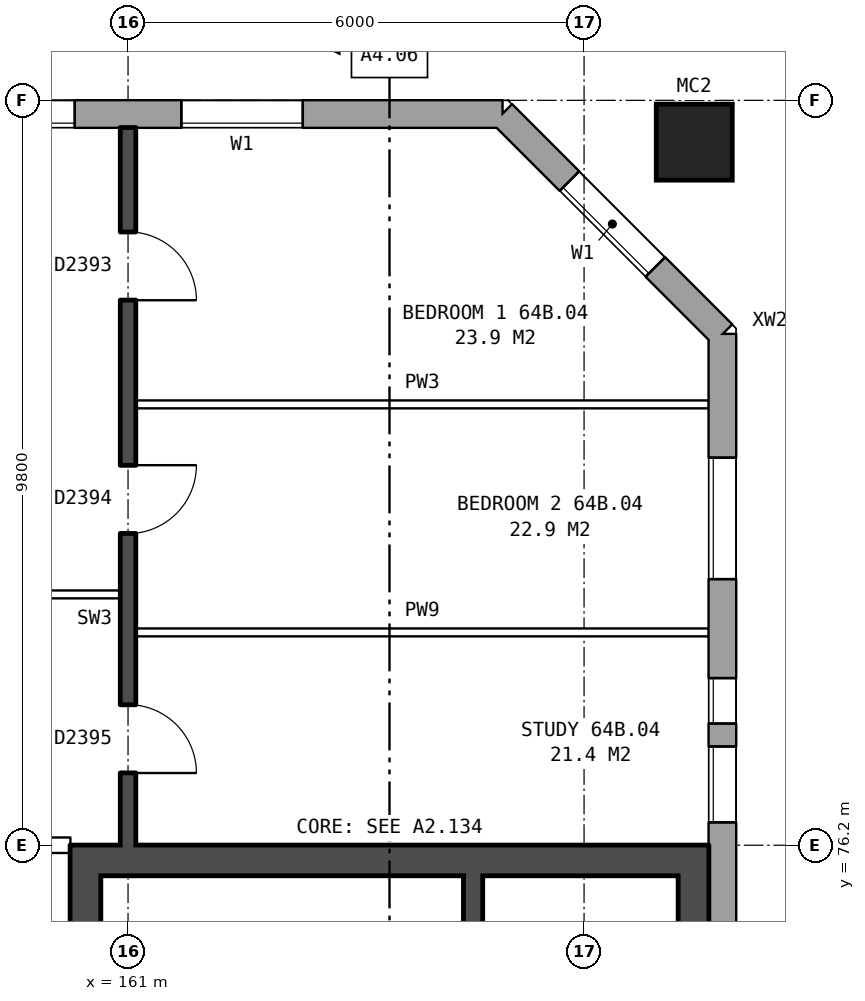
"""IFC4 building model, lengths in metres.
Left out: names, types, materials, properties, quantities, classifications, styles, units other than length and angle.
Written with IfcOpenShell. Run it as: python <this file> out.ifc"""

import sys

from ifc_helpers import new_model, si_unit, direction, frame, frame_2d, origin, origin_2d, place, context, subcontext, project, spatial, rectangle, hollow_rectangle, extrude, element, fill, save


model = new_model("IFC4")
c1 = context("Model", 3, precision=1e-05, world=origin(), true_north=direction((0.0, 1.0)))
c2 = subcontext(c1, "Body", "Model", "MODEL_VIEW")
j1 = project(units=[si_unit("LENGTHUNIT", "METRE"), si_unit("PLANEANGLEUNIT", "RADIAN")], contexts=[c1])
p1 = place(None, origin())
s1 = spatial("IfcSite", under=j1, at=p1, CompositionType="ELEMENT")
p2 = place(p1, origin())
s2 = spatial("IfcBuilding", under=s1, at=p2, CompositionType="ELEMENT")
p3 = place(p2, frame((0.0, 0.0, 227.6)))
s3 = spatial("IfcBuildingStorey", under=s2, at=p3, CompositionType="ELEMENT", Elevation=227.6)
p4 = place(p3, frame((168.45, 85.45, 0.0), z_axis=(0.0, 0.0, 1.0), x_axis=(1.0, 0.0, 0.0)))
e1 = element("IfcColumn", 1, at=p4, inside=s3, PredefinedType="COLUMN", context=c2, shape_type="SweptSolid", body=[
    extrude(hollow_rectangle(XDim=1.0, YDim=1.0, WallThickness=0.055, at=origin_2d()), origin(), (0.0, 0.0, 1.0), 3.1),
])
p5 = place(p3, frame((168.82, 57.075, 0.0), z_axis=(0.0, 0.0, 1.0), x_axis=(0.0, 1.0, 0.0)))
e2 = element("IfcWall", 2, at=p5, inside=s3, PredefinedType="STANDARD", context=c2, shape_type="SweptSolid", body=[
    extrude(rectangle(XDim=25.851, YDim=0.36, at=frame_2d((12.925, 0.0))), origin(), (0.0, 0.0, 1.0), 2.85),
])
p6 = place(p5, frame((1.625, 0.0, 0.8)))
e3 = element("IfcOpeningElement", 3, at=p6, cuts=e2, PredefinedType="OPENING", context=c2, shape_type="SweptSolid", body=[
    extrude(rectangle(XDim=1.6, YDim=1.8, at=frame_2d((0.8, 0.9))), frame((0.0, 0.19, 0.0), z_axis=(0.0, -1.0, 0.0), x_axis=(1.0, 0.0, 0.0)), (0.0, 0.0, 1.0), 0.38),
])
p7 = place(p5, frame((4.425, 0.0, 1.7)))
e4 = element("IfcOpeningElement", 4, at=p7, cuts=e2, PredefinedType="OPENING", context=c2, shape_type="SweptSolid", body=[
    extrude(rectangle(XDim=0.6, YDim=0.9, at=frame_2d((0.3, 0.45))), frame((0.0, 0.19, 0.0), z_axis=(0.0, -1.0, 0.0), x_axis=(1.0, 0.0, 0.0)), (0.0, 0.0, 1.0), 0.38),
])
p8 = place(p5, frame((19.425, 0.0, 0.8)))
e5 = element("IfcOpeningElement", 5, at=p8, cuts=e2, PredefinedType="OPENING", context=c2, shape_type="SweptSolid", body=[
    extrude(rectangle(XDim=1.0, YDim=1.8, at=frame_2d((0.5, 0.9))), frame((0.0, 0.19, 0.0), z_axis=(0.0, -1.0, 0.0), x_axis=(1.0, 0.0, 0.0)), (0.0, 0.0, 1.0), 0.38),
])
p9 = place(p5, frame((22.625, 0.0, 0.8)))
e6 = element("IfcOpeningElement", 6, at=p9, cuts=e2, PredefinedType="OPENING", context=c2, shape_type="SweptSolid", body=[
    extrude(rectangle(XDim=1.6, YDim=1.8, at=frame_2d((0.8, 0.9))), frame((0.0, 0.19, 0.0), z_axis=(0.0, -1.0, 0.0), x_axis=(1.0, 0.0, 0.0)), (0.0, 0.0, 1.0), 0.38),
])
p10 = place(p5, frame((5.325, 0.0, 0.8)))
e7 = element("IfcOpeningElement", 7, at=p10, cuts=e2, PredefinedType="OPENING", context=c2, shape_type="SweptSolid", body=[
    extrude(rectangle(XDim=1.0, YDim=1.8, at=frame_2d((0.5, 0.9))), frame((0.0, 0.19, 0.0), z_axis=(0.0, -1.0, 0.0), x_axis=(1.0, 0.0, 0.0)), (0.0, 0.0, 1.0), 0.38),
])
p11 = place(p5, frame((20.725, 0.0, 1.6)))
e8 = element("IfcOpeningElement", 8, at=p11, cuts=e2, PredefinedType="OPENING", context=c2, shape_type="SweptSolid", body=[
    extrude(rectangle(XDim=0.6, YDim=0.9, at=frame_2d((0.3, 0.45))), frame((0.0, 0.19, 0.0), z_axis=(0.0, -1.0, 0.0), x_axis=(1.0, 0.0, 0.0)), (0.0, 0.0, 1.0), 0.38),
])
p12 = place(p3, frame((168.82, 82.925, 0.0), z_axis=(0.0, 0.0, 1.0), x_axis=(-0.707106781187, 0.707106781187, 0.0)))
e9 = element("IfcWall", 9, at=p12, inside=s3, PredefinedType="STANDARD", context=c2, shape_type="SweptSolid", body=[
    extrude(rectangle(XDim=4.094, YDim=0.36, at=frame_2d((2.047, 0.0))), origin(), (0.0, 0.0, 1.0), 2.85),
])
p13 = place(p12, frame((1.247, 0.0, 0.8)))
e10 = element("IfcOpeningElement", 10, at=p13, cuts=e9, PredefinedType="OPENING", context=c2, shape_type="SweptSolid", body=[
    extrude(rectangle(XDim=1.6, YDim=1.8, at=frame_2d((0.8, 0.9))), frame((0.0, 0.19, 0.0), z_axis=(0.0, -1.0, 0.0), x_axis=(1.0, 0.0, 0.0)), (0.0, 0.0, 1.0), 0.38),
])
p14 = place(p3, frame((165.925, 85.82, 0.0), z_axis=(0.0, 0.0, 1.0), x_axis=(-1.0, 0.0, 0.0)))
e11 = element("IfcWall", 11, at=p14, inside=s3, PredefinedType="STANDARD", context=c2, shape_type="SweptSolid", body=[
    extrude(rectangle(XDim=33.875, YDim=0.36, at=frame_2d((16.938, 0.0))), origin(), (0.0, 0.0, 1.0), 2.85),
])
p15 = place(p14, frame((2.625, 0.0, 0.8)))
e12 = element("IfcOpeningElement", 12, at=p15, cuts=e11, PredefinedType="OPENING", context=c2, shape_type="SweptSolid", body=[
    extrude(rectangle(XDim=1.6, YDim=1.8, at=frame_2d((0.8, 0.9))), frame((0.0, 0.19, 0.0), z_axis=(0.0, -1.0, 0.0), x_axis=(1.0, 0.0, 0.0)), (0.0, 0.0, 1.0), 0.38),
])
p16 = place(p14, frame((5.625, 0.0, 0.8)))
e13 = element("IfcOpeningElement", 13, at=p16, cuts=e11, PredefinedType="OPENING", context=c2, shape_type="SweptSolid", body=[
    extrude(rectangle(XDim=1.6, YDim=1.8, at=frame_2d((0.8, 0.9))), frame((0.0, 0.19, 0.0), z_axis=(0.0, -1.0, 0.0), x_axis=(1.0, 0.0, 0.0)), (0.0, 0.0, 1.0), 0.38),
])
p17 = place(p14, frame((8.625, 0.0, 0.8)))
e14 = element("IfcOpeningElement", 14, at=p17, cuts=e11, PredefinedType="OPENING", context=c2, shape_type="SweptSolid", body=[
    extrude(rectangle(XDim=1.6, YDim=1.8, at=frame_2d((0.8, 0.9))), frame((0.0, 0.19, 0.0), z_axis=(0.0, -1.0, 0.0), x_axis=(1.0, 0.0, 0.0)), (0.0, 0.0, 1.0), 0.38),
])
p18 = place(p14, frame((12.675, 0.0, 0.15)))
e15 = element("IfcOpeningElement", 15, at=p18, cuts=e11, PredefinedType="OPENING", context=c2, shape_type="SweptSolid", body=[
    extrude(rectangle(XDim=1.0, YDim=1.8, at=frame_2d((0.5, 0.9))), frame((0.0, 0.19, 0.0), z_axis=(0.0, -1.0, 0.0), x_axis=(1.0, 0.0, 0.0)), (0.0, 0.0, 1.0), 0.38),
])
p19 = place(p14, frame((14.625, 0.0, 0.8)))
e16 = element("IfcOpeningElement", 16, at=p19, cuts=e11, PredefinedType="OPENING", context=c2, shape_type="SweptSolid", body=[
    extrude(rectangle(XDim=1.6, YDim=1.8, at=frame_2d((0.8, 0.9))), frame((0.0, 0.19, 0.0), z_axis=(0.0, -1.0, 0.0), x_axis=(1.0, 0.0, 0.0)), (0.0, 0.0, 1.0), 0.38),
])
p20 = place(p14, frame((17.125, 0.0, 0.8)))
e17 = element("IfcOpeningElement", 17, at=p20, cuts=e11, PredefinedType="OPENING", context=c2, shape_type="SweptSolid", body=[
    extrude(rectangle(XDim=1.6, YDim=1.8, at=frame_2d((0.8, 0.9))), frame((0.0, 0.19, 0.0), z_axis=(0.0, -1.0, 0.0), x_axis=(1.0, 0.0, 0.0)), (0.0, 0.0, 1.0), 0.38),
])
p21 = place(p14, frame((20.425, 0.0, 1.7)))
e18 = element("IfcOpeningElement", 18, at=p21, cuts=e11, PredefinedType="OPENING", context=c2, shape_type="SweptSolid", body=[
    extrude(rectangle(XDim=0.6, YDim=0.9, at=frame_2d((0.3, 0.45))), frame((0.0, 0.19, 0.0), z_axis=(0.0, -1.0, 0.0), x_axis=(1.0, 0.0, 0.0)), (0.0, 0.0, 1.0), 0.38),
])
p22 = place(p14, frame((23.625, 0.0, 0.8)))
e19 = element("IfcOpeningElement", 19, at=p22, cuts=e11, PredefinedType="OPENING", context=c2, shape_type="SweptSolid", body=[
    extrude(rectangle(XDim=1.6, YDim=1.8, at=frame_2d((0.8, 0.9))), frame((0.0, 0.19, 0.0), z_axis=(0.0, -1.0, 0.0), x_axis=(1.0, 0.0, 0.0)), (0.0, 0.0, 1.0), 0.38),
])
p23 = place(p14, frame((26.625, 0.0, 0.8)))
e20 = element("IfcOpeningElement", 20, at=p23, cuts=e11, PredefinedType="OPENING", context=c2, shape_type="SweptSolid", body=[
    extrude(rectangle(XDim=1.6, YDim=1.8, at=frame_2d((0.8, 0.9))), frame((0.0, 0.19, 0.0), z_axis=(0.0, -1.0, 0.0), x_axis=(1.0, 0.0, 0.0)), (0.0, 0.0, 1.0), 0.38),
])
p24 = place(p14, frame((29.625, 0.0, 0.8)))
e21 = element("IfcOpeningElement", 21, at=p24, cuts=e11, PredefinedType="OPENING", context=c2, shape_type="SweptSolid", body=[
    extrude(rectangle(XDim=1.6, YDim=1.8, at=frame_2d((0.8, 0.9))), frame((0.0, 0.19, 0.0), z_axis=(0.0, -1.0, 0.0), x_axis=(1.0, 0.0, 0.0)), (0.0, 0.0, 1.0), 0.38),
])
p25 = place(p14, frame((21.325, 0.0, 0.8)))
e22 = element("IfcOpeningElement", 22, at=p25, cuts=e11, PredefinedType="OPENING", context=c2, shape_type="SweptSolid", body=[
    extrude(rectangle(XDim=1.4, YDim=1.8, at=frame_2d((0.7, 0.9))), frame((0.0, 0.19, 0.0), z_axis=(0.0, -1.0, 0.0), x_axis=(1.0, 0.0, 0.0)), (0.0, 0.0, 1.0), 0.38),
])
p26 = place(p3, frame((160.44, 76.2, 0.0), z_axis=(0.0, 0.0, 1.0), x_axis=(0.0, -1.0, 0.0)))
e23 = element("IfcWall", 23, at=p26, inside=s3, PredefinedType="SHEAR", context=c2, shape_type="SweptSolid", body=[
    extrude(rectangle(XDim=12.4, YDim=0.4, at=frame_2d((6.2, 0.0))), origin(), (0.0, 0.0, 1.0), 2.85),
])
p27 = place(p26, frame((1.325, 0.0, 0.0)))
e24 = element("IfcOpeningElement", 24, at=p27, cuts=e23, PredefinedType="OPENING", context=c2, shape_type="SweptSolid", body=[
    extrude(rectangle(XDim=1.1, YDim=2.1, at=frame_2d((0.55, 1.05))), frame((0.0, 0.21, 0.0), z_axis=(0.0, -1.0, 0.0), x_axis=(1.0, 0.0, 0.0)), (0.0, 0.0, 1.0), 0.42),
])
p28 = place(p26, frame((3.625, 0.0, 0.0)))
e25 = element("IfcOpeningElement", 25, at=p28, cuts=e23, PredefinedType="OPENING", context=c2, shape_type="SweptSolid", body=[
    extrude(rectangle(XDim=0.85, YDim=2.1, at=frame_2d((0.425, 1.05))), frame((0.0, 0.21, 0.0), z_axis=(0.0, -1.0, 0.0), x_axis=(1.0, 0.0, 0.0)), (0.0, 0.0, 1.0), 0.42),
])
p29 = place(p26, frame((5.775, 0.0, 0.0)))
e26 = element("IfcOpeningElement", 26, at=p29, cuts=e23, PredefinedType="OPENING", context=c2, shape_type="SweptSolid", body=[
    extrude(rectangle(XDim=0.85, YDim=2.1, at=frame_2d((0.425, 1.05))), frame((0.0, 0.21, 0.0), z_axis=(0.0, -1.0, 0.0), x_axis=(1.0, 0.0, 0.0)), (0.0, 0.0, 1.0), 0.42),
])
p30 = place(p26, frame((9.9, 0.0, 0.0)))
e27 = element("IfcOpeningElement", 27, at=p30, cuts=e23, PredefinedType="OPENING", context=c2, shape_type="SweptSolid", body=[
    extrude(rectangle(XDim=1.1, YDim=2.1, at=frame_2d((0.55, 1.05))), frame((0.0, 0.21, 0.0), z_axis=(0.0, -1.0, 0.0), x_axis=(1.0, 0.0, 0.0)), (0.0, 0.0, 1.0), 0.42),
])
p31 = place(p26, frame((8.125, 0.0, 0.0)))
e28 = element("IfcOpeningElement", 28, at=p31, cuts=e23, PredefinedType="OPENING", context=c2, shape_type="SweptSolid", body=[
    extrude(rectangle(XDim=0.85, YDim=2.1, at=frame_2d((0.425, 1.05))), frame((0.0, 0.21, 0.0), z_axis=(0.0, -1.0, 0.0), x_axis=(1.0, 0.0, 0.0)), (0.0, 0.0, 1.0), 0.42),
])
p32 = place(p3, frame((168.44, 76.2, 0.0), z_axis=(0.0, 0.0, 1.0), x_axis=(0.0, -1.0, 0.0)))
e29 = element("IfcWall", 29, at=p32, inside=s3, PredefinedType="SHEAR", context=c2, shape_type="SweptSolid", body=[
    extrude(rectangle(XDim=12.4, YDim=0.4, at=frame_2d((6.2, 0.0))), origin(), (0.0, 0.0, 1.0), 2.85),
])
p33 = place(p3, frame((160.64, 76.0, 0.0), z_axis=(0.0, 0.0, 1.0), x_axis=(1.0, 0.0, 0.0)))
e30 = element("IfcWall", 30, at=p33, inside=s3, PredefinedType="SHEAR", context=c2, shape_type="SweptSolid", body=[
    extrude(rectangle(XDim=7.6, YDim=0.4, at=frame_2d((3.8, 0.0))), origin(), (0.0, 0.0, 1.0), 2.85),
])
p34 = place(p3, frame((165.54, 75.8, 0.0), z_axis=(0.0, 0.0, 1.0), x_axis=(0.0, -1.0, 0.0)))
e31 = element("IfcWall", 31, at=p34, inside=s3, PredefinedType="SHEAR", context=c2, shape_type="SweptSolid", body=[
    extrude(rectangle(XDim=6.925, YDim=0.25, at=frame_2d((3.462, 0.0))), origin(), (0.0, 0.0, 1.0), 2.85),
])
p35 = place(p3, frame((157.24, 76.2, 0.0), z_axis=(0.0, 0.0, 1.0), x_axis=(1.0, 0.0, 0.0)))
e32 = element("IfcWall", 32, at=p35, inside=s3, PredefinedType="PARTITIONING", context=c2, shape_type="SweptSolid", body=[
    extrude(rectangle(XDim=3.0, YDim=0.2, at=frame_2d((1.5, 0.0))), origin(), (0.0, 0.0, 1.0), 2.85),
])
p36 = place(p35, frame((1.0, 0.0, 0.0)))
e33 = element("IfcOpeningElement", 33, at=p36, cuts=e32, PredefinedType="OPENING", context=c2, shape_type="SweptSolid", body=[
    extrude(rectangle(XDim=1.0, YDim=2.1, at=frame_2d((0.5, 1.05))), frame((0.0, 0.11, 0.0), z_axis=(0.0, -1.0, 0.0), x_axis=(1.0, 0.0, 0.0)), (0.0, 0.0, 1.0), 0.22),
])
p37 = place(p3, frame((161.1, 79.0, 0.0), z_axis=(0.0, 0.0, 1.0), x_axis=(1.0, 0.0, 0.0)))
e34 = element("IfcWall", 34, at=p37, inside=s3, PredefinedType="PARTITIONING", context=c2, shape_type="SweptSolid", body=[
    extrude(rectangle(XDim=7.54, YDim=0.1, at=frame_2d((3.77, 0.0))), origin(), (0.0, 0.0, 1.0), 2.85),
])
p38 = place(p3, frame((155.1, 79.5, 0.0), z_axis=(0.0, 0.0, 1.0), x_axis=(1.0, 0.0, 0.0)))
e35 = element("IfcWall", 35, at=p38, inside=s3, PredefinedType="PARTITIONING", context=c2, shape_type="SweptSolid", body=[
    extrude(rectangle(XDim=5.8, YDim=0.1, at=frame_2d((2.9, 0.0))), origin(), (0.0, 0.0, 1.0), 2.85),
])
p39 = place(p38, frame((3.6, 0.0, 0.0)))
e36 = element("IfcOpeningElement", 36, at=p39, cuts=e35, PredefinedType="OPENING", context=c2, shape_type="SweptSolid", body=[
    extrude(rectangle(XDim=0.9, YDim=2.1, at=frame_2d((0.45, 1.05))), frame((0.0, 0.06, 0.0), z_axis=(0.0, -1.0, 0.0), x_axis=(1.0, 0.0, 0.0)), (0.0, 0.0, 1.0), 0.12),
])
p40 = place(p38, frame((0.7, 0.0, 0.0)))
e37 = element("IfcOpeningElement", 37, at=p40, cuts=e35, PredefinedType="OPENING", context=c2, shape_type="SweptSolid", body=[
    extrude(rectangle(XDim=0.9, YDim=2.1, at=frame_2d((0.45, 1.05))), frame((0.0, 0.06, 0.0), z_axis=(0.0, -1.0, 0.0), x_axis=(1.0, 0.0, 0.0)), (0.0, 0.0, 1.0), 0.12),
])
p41 = place(p3, frame((161.1, 82.0, 0.0), z_axis=(0.0, 0.0, 1.0), x_axis=(1.0, 0.0, 0.0)))
e38 = element("IfcWall", 38, at=p41, inside=s3, PredefinedType="PARTITIONING", context=c2, shape_type="SweptSolid", body=[
    extrude(rectangle(XDim=7.54, YDim=0.1, at=frame_2d((3.77, 0.0))), origin(), (0.0, 0.0, 1.0), 2.85),
])
p42 = place(p3, frame((161.0, 76.2, 0.0), z_axis=(0.0, 0.0, 1.0), x_axis=(0.0, 1.0, 0.0)))
e39 = element("IfcWall", 39, at=p42, inside=s3, PredefinedType="SOLIDWALL", context=c2, shape_type="SweptSolid", body=[
    extrude(rectangle(XDim=9.44, YDim=0.2, at=frame_2d((4.72, 0.0))), origin(), (0.0, 0.0, 1.0), 2.85),
])
p43 = place(p42, frame((7.17, 0.0, 0.0)))
e40 = element("IfcOpeningElement", 40, at=p43, cuts=e39, PredefinedType="OPENING", context=c2, shape_type="SweptSolid", body=[
    extrude(rectangle(XDim=0.9, YDim=2.1, at=frame_2d((0.45, 1.05))), frame((0.0, 0.11, 0.0), z_axis=(0.0, -1.0, 0.0), x_axis=(1.0, 0.0, 0.0)), (0.0, 0.0, 1.0), 0.22),
])
p44 = place(p42, frame((4.1, 0.0, 0.0)))
e41 = element("IfcOpeningElement", 41, at=p44, cuts=e39, PredefinedType="OPENING", context=c2, shape_type="SweptSolid", body=[
    extrude(rectangle(XDim=0.9, YDim=2.1, at=frame_2d((0.45, 1.05))), frame((0.0, 0.11, 0.0), z_axis=(0.0, -1.0, 0.0), x_axis=(1.0, 0.0, 0.0)), (0.0, 0.0, 1.0), 0.22),
])
p45 = place(p42, frame((0.95, 0.0, 0.0)))
e42 = element("IfcOpeningElement", 42, at=p45, cuts=e39, PredefinedType="OPENING", context=c2, shape_type="SweptSolid", body=[
    extrude(rectangle(XDim=0.9, YDim=2.1, at=frame_2d((0.45, 1.05))), frame((0.0, 0.11, 0.0), z_axis=(0.0, -1.0, 0.0), x_axis=(1.0, 0.0, 0.0)), (0.0, 0.0, 1.0), 0.22),
])
p46 = place(p8, origin())
e43 = element("IfcWindow", 43, at=p46, inside=s3, PartitioningType="SINGLE_PANEL", PredefinedType="WINDOW", context=c2, shape_type="SweptSolid", body=[
    extrude(rectangle(XDim=1.0, YDim=1.8, at=frame_2d((0.5, 0.9))), frame((0.0, 0.15, 0.0), z_axis=(0.0, -1.0, 0.0), x_axis=(1.0, 0.0, 0.0)), (0.0, 0.0, 1.0), 0.06),
])
fill(e5, e43)
p47 = place(p9, origin())
e44 = element("IfcWindow", 44, at=p47, inside=s3, PartitioningType="SINGLE_PANEL", PredefinedType="WINDOW", context=c2, shape_type="SweptSolid", body=[
    extrude(rectangle(XDim=1.6, YDim=1.8, at=frame_2d((0.8, 0.9))), frame((0.0, 0.15, 0.0), z_axis=(0.0, -1.0, 0.0), x_axis=(1.0, 0.0, 0.0)), (0.0, 0.0, 1.0), 0.06),
])
fill(e6, e44)
p48 = place(p13, origin())
e45 = element("IfcWindow", 45, at=p48, inside=s3, PartitioningType="SINGLE_PANEL", PredefinedType="WINDOW", context=c2, shape_type="SweptSolid", body=[
    extrude(rectangle(XDim=1.6, YDim=1.8, at=frame_2d((0.8, 0.9))), frame((0.0, 0.15, 0.0), z_axis=(0.0, -1.0, 0.0), x_axis=(1.0, 0.0, 0.0)), (0.0, 0.0, 1.0), 0.06),
])
fill(e10, e45)
p49 = place(p15, origin())
e46 = element("IfcWindow", 46, at=p49, inside=s3, PartitioningType="SINGLE_PANEL", PredefinedType="WINDOW", context=c2, shape_type="SweptSolid", body=[
    extrude(rectangle(XDim=1.6, YDim=1.8, at=frame_2d((0.8, 0.9))), frame((0.0, 0.15, 0.0), z_axis=(0.0, -1.0, 0.0), x_axis=(1.0, 0.0, 0.0)), (0.0, 0.0, 1.0), 0.06),
])
fill(e12, e46)
p50 = place(p16, origin())
e47 = element("IfcWindow", 47, at=p50, inside=s3, PartitioningType="SINGLE_PANEL", PredefinedType="WINDOW", context=c2, shape_type="SweptSolid", body=[
    extrude(rectangle(XDim=1.6, YDim=1.8, at=frame_2d((0.8, 0.9))), frame((0.0, 0.15, 0.0), z_axis=(0.0, -1.0, 0.0), x_axis=(1.0, 0.0, 0.0)), (0.0, 0.0, 1.0), 0.06),
])
fill(e13, e47)
p51 = place(p43, frame((0.9, 0.0, 0.0), z_axis=(0.0, 0.0, 1.0), x_axis=(-1.0, 0.0, 0.0)))
e48 = element("IfcDoor", 48, at=p51, inside=s3, OperationType="SINGLE_SWING_RIGHT", PredefinedType="DOOR", context=c2, shape_type="SweptSolid", body=[
    extrude(rectangle(XDim=0.9, YDim=2.1, at=frame_2d((0.45, 1.05))), frame((0.0, 0.025, 0.0), z_axis=(0.0, -1.0, 0.0), x_axis=(1.0, 0.0, 0.0)), (0.0, 0.0, 1.0), 0.05),
])
fill(e40, e48)
p52 = place(p44, frame((0.9, 0.0, 0.0), z_axis=(0.0, 0.0, 1.0), x_axis=(-1.0, 0.0, 0.0)))
e49 = element("IfcDoor", 49, at=p52, inside=s3, OperationType="SINGLE_SWING_LEFT", PredefinedType="DOOR", context=c2, shape_type="SweptSolid", body=[
    extrude(rectangle(XDim=0.9, YDim=2.1, at=frame_2d((0.45, 1.05))), frame((0.0, 0.025, 0.0), z_axis=(0.0, -1.0, 0.0), x_axis=(1.0, 0.0, 0.0)), (0.0, 0.0, 1.0), 0.05),
])
fill(e41, e49)
p53 = place(p45, frame((0.9, 0.0, 0.0), z_axis=(0.0, 0.0, 1.0), x_axis=(-1.0, 0.0, 0.0)))
e50 = element("IfcDoor", 50, at=p53, inside=s3, OperationType="SINGLE_SWING_RIGHT", PredefinedType="DOOR", context=c2, shape_type="SweptSolid", body=[
    extrude(rectangle(XDim=0.9, YDim=2.1, at=frame_2d((0.45, 1.05))), frame((0.0, 0.025, 0.0), z_axis=(0.0, -1.0, 0.0), x_axis=(1.0, 0.0, 0.0)), (0.0, 0.0, 1.0), 0.05),
])
fill(e42, e50)
p54 = place(p11, origin())
e51 = element("IfcWindow", 51, at=p54, inside=s3, PartitioningType="SINGLE_PANEL", PredefinedType="WINDOW", context=c2, shape_type="SweptSolid", body=[
    extrude(rectangle(XDim=0.6, YDim=0.9, at=frame_2d((0.3, 0.45))), frame((0.0, 0.15, 0.0), z_axis=(0.0, -1.0, 0.0), x_axis=(1.0, 0.0, 0.0)), (0.0, 0.0, 1.0), 0.06),
])
fill(e8, e51)
save(model, sys.argv[1])
